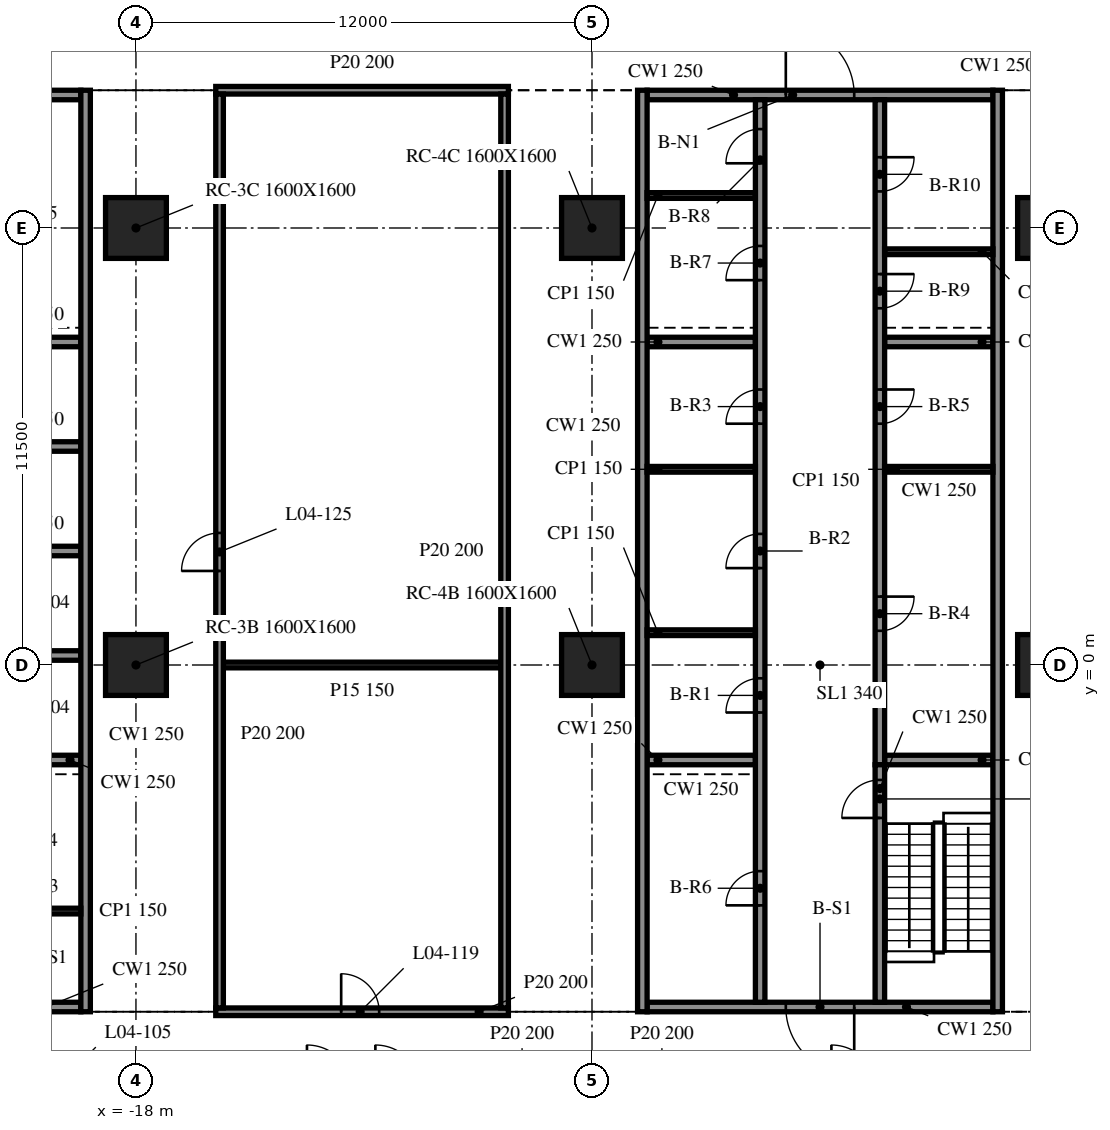
"""IFC4 building model, lengths in metres.
Left out: names, types, materials, properties, quantities, classifications, styles, units other than length and angle.
Written with IfcOpenShell. Run it as: python <this file> out.ifc"""

import sys

from ifc_helpers import new_model, si_unit, direction, frame, frame_2d, origin, origin_2d, place, context, subcontext, project, spatial, rectangle, extrude, element, fill, save


model = new_model("IFC4")
c1 = context("Model", 3, precision=1e-05, world=origin(), true_north=direction((0.0, 1.0)))
c2 = subcontext(c1, "Body", "Model", "MODEL_VIEW")
j1 = project(units=[si_unit("LENGTHUNIT", "METRE"), si_unit("PLANEANGLEUNIT", "RADIAN")], contexts=[c1])
p1 = place(None, origin())
s1 = spatial("IfcSite", under=j1, at=p1, CompositionType="ELEMENT")
p2 = place(p1, origin())
s2 = spatial("IfcBuilding", under=s1, at=p2, CompositionType="ELEMENT")
p3 = place(p2, frame((0.0, 0.0, 20.1)))
s3 = spatial("IfcBuildingStorey", under=s2, at=p3, CompositionType="ELEMENT", Elevation=20.1)
for number, where, z_axis, x_axis in (
    (1, (-18.0, 0.0, -0.34), (0.0, 0.0, 1.0), (1.0, 0.0, 0.0)),
    (2, (-18.0, 11.5, -0.34), (0.0, 0.0, 1.0), (1.0, 0.0, 0.0)),
    (3, (-6.0, 0.0, -0.34), (0.0, 0.0, 1.0), (1.0, 0.0, 0.0)),
    (4, (-6.0, 11.5, -0.34), (0.0, 0.0, 1.0), (1.0, 0.0, 0.0)),
    (5, (6.0, 0.0, -0.34), (0.0, 0.0, 1.0), (1.0, 0.0, 0.0)),
    (6, (6.0, 11.5, -0.34), (0.0, 0.0, 1.0), (1.0, 0.0, 0.0)),
):
    element("IfcColumn", number, at=place(p3, frame(where, z_axis=z_axis, x_axis=x_axis)), inside=s3, PredefinedType="COLUMN", context=c2, shape_type="SweptSolid", body=[
        extrude(rectangle(XDim=1.6, YDim=1.6, at=origin_2d()), origin(), (0.0, 0.0, 1.0), 4.3),
    ])
p4 = place(p3, frame((-19.325, -9.125, 0.0), z_axis=(0.0, 0.0, 1.0), x_axis=(0.0, 1.0, 0.0)))
e7 = element("IfcWall", 7, at=p4, inside=s3, PredefinedType="SOLIDWALL", context=c2, shape_type="SweptSolid", body=[
    extrude(rectangle(XDim=24.25, YDim=0.25, at=frame_2d((12.125, 0.0))), origin(), (0.0, 0.0, 1.0), 3.96),
])
p5 = place(p3, frame((-19.45, -9.0, 0.0), z_axis=(0.0, 0.0, 1.0), x_axis=(-1.0, 0.0, 0.0)))
e8 = element("IfcWall", 8, at=p5, inside=s3, PredefinedType="SOLIDWALL", context=c2, shape_type="SweptSolid", body=[
    extrude(rectangle(XDim=9.1, YDim=0.25, at=frame_2d((4.55, 0.0))), origin(), (0.0, 0.0, 1.0), 3.96),
])
p6 = place(p5, frame((3.65, 0.0, 0.0)))
e9 = element("IfcOpeningElement", 9, at=p6, cuts=e8, PredefinedType="OPENING", context=c2, shape_type="SweptSolid", body=[
    extrude(rectangle(XDim=1.8, YDim=2.1, at=frame_2d((0.9, 1.05))), frame((0.0, 0.135, 0.0), z_axis=(0.0, -1.0, 0.0), x_axis=(1.0, 0.0, 0.0)), (0.0, 0.0, 1.0), 0.27),
])
p7 = place(p3, frame((-28.55, 15.0, 0.0), z_axis=(0.0, 0.0, 1.0), x_axis=(1.0, 0.0, 0.0)))
e10 = element("IfcWall", 10, at=p7, inside=s3, PredefinedType="SOLIDWALL", context=c2, shape_type="SweptSolid", body=[
    extrude(rectangle(XDim=9.1, YDim=0.25, at=frame_2d((4.55, 0.0))), origin(), (0.0, 0.0, 1.0), 3.96),
])
p8 = place(p7, frame((3.65, 0.0, 0.0)))
e11 = element("IfcOpeningElement", 11, at=p8, cuts=e10, PredefinedType="OPENING", context=c2, shape_type="SweptSolid", body=[
    extrude(rectangle(XDim=1.8, YDim=2.1, at=frame_2d((0.9, 1.05))), frame((0.0, 0.135, 0.0), z_axis=(0.0, -1.0, 0.0), x_axis=(1.0, 0.0, 0.0)), (0.0, 0.0, 1.0), 0.27),
])
for number, where, z_axis, x_axis in (
    (12, (-22.3, -2.5, 0.0), (0.0, 0.0, 1.0), (1.0, 0.0, 0.0)),
    (13, (-22.3, 0.25, 0.0), (0.0, 0.0, 1.0), (1.0, 0.0, 0.0)),
    (14, (-22.3, 3.0, 0.0), (0.0, 0.0, 1.0), (1.0, 0.0, 0.0)),
    (15, (-22.3, 5.75, 0.0), (0.0, 0.0, 1.0), (1.0, 0.0, 0.0)),
    (16, (-22.3, 8.5, 0.0), (0.0, 0.0, 1.0), (1.0, 0.0, 0.0)),
):
    element("IfcWall", number, at=place(p3, frame(where, z_axis=z_axis, x_axis=x_axis)), inside=s3, PredefinedType="SOLIDWALL", context=c2, shape_type="SweptSolid", body=[
        extrude(rectangle(XDim=2.85, YDim=0.25, at=frame_2d((1.425, 0.0))), origin(), (0.0, 0.0, 1.0), 3.96),
    ])
p9 = place(p3, frame((-22.3, -6.475, 0.0), z_axis=(0.0, 0.0, 1.0), x_axis=(1.0, 0.0, 0.0)))
e17 = element("IfcWall", 17, at=p9, inside=s3, PredefinedType="PARTITIONING", context=c2, shape_type="SweptSolid", body=[
    extrude(rectangle(XDim=2.85, YDim=0.15, at=frame_2d((1.425, 0.0))), origin(), (0.0, 0.0, 1.0), 3.96),
])
for number, where, z_axis, x_axis in (
    (18, (-4.675, 15.125, 0.0), (0.0, 0.0, 1.0), (0.0, -1.0, 0.0)),
    (19, (4.675, -9.125, 0.0), (0.0, 0.0, 1.0), (0.0, 1.0, 0.0)),
):
    element("IfcWall", number, at=place(p3, frame(where, z_axis=z_axis, x_axis=x_axis)), inside=s3, PredefinedType="SOLIDWALL", context=c2, shape_type="SweptSolid", body=[
        extrude(rectangle(XDim=24.25, YDim=0.25, at=frame_2d((12.125, 0.0))), origin(), (0.0, 0.0, 1.0), 3.96),
    ])
p10 = place(p3, frame((4.55, -9.0, 0.0), z_axis=(0.0, 0.0, 1.0), x_axis=(-1.0, 0.0, 0.0)))
e20 = element("IfcWall", 20, at=p10, inside=s3, PredefinedType="SOLIDWALL", context=c2, shape_type="SweptSolid", body=[
    extrude(rectangle(XDim=9.1, YDim=0.25, at=frame_2d((4.55, 0.0))), origin(), (0.0, 0.0, 1.0), 3.96),
])
p11 = place(p10, frame((3.65, 0.0, 0.0)))
e21 = element("IfcOpeningElement", 21, at=p11, cuts=e20, PredefinedType="OPENING", context=c2, shape_type="SweptSolid", body=[
    extrude(rectangle(XDim=1.8, YDim=2.1, at=frame_2d((0.9, 1.05))), frame((0.0, 0.135, 0.0), z_axis=(0.0, -1.0, 0.0), x_axis=(1.0, 0.0, 0.0)), (0.0, 0.0, 1.0), 0.27),
])
p12 = place(p3, frame((-4.55, 15.0, 0.0), z_axis=(0.0, 0.0, 1.0), x_axis=(1.0, 0.0, 0.0)))
e22 = element("IfcWall", 22, at=p12, inside=s3, PredefinedType="SOLIDWALL", context=c2, shape_type="SweptSolid", body=[
    extrude(rectangle(XDim=9.1, YDim=0.25, at=frame_2d((4.55, 0.0))), origin(), (0.0, 0.0, 1.0), 3.96),
])
p13 = place(p12, frame((3.65, 0.0, 0.0)))
e23 = element("IfcOpeningElement", 23, at=p13, cuts=e22, PredefinedType="OPENING", context=c2, shape_type="SweptSolid", body=[
    extrude(rectangle(XDim=1.8, YDim=2.1, at=frame_2d((0.9, 1.05))), frame((0.0, 0.135, 0.0), z_axis=(0.0, -1.0, 0.0), x_axis=(1.0, 0.0, 0.0)), (0.0, 0.0, 1.0), 0.27),
])
p14 = place(p3, frame((-1.575, -8.875, 0.0), z_axis=(0.0, 0.0, 1.0), x_axis=(0.0, 1.0, 0.0)))
e24 = element("IfcWall", 24, at=p14, inside=s3, PredefinedType="SOLIDWALL", context=c2, shape_type="SweptSolid", body=[
    extrude(rectangle(XDim=23.75, YDim=0.25, at=frame_2d((11.875, 0.0))), origin(), (0.0, 0.0, 1.0), 3.96),
])
p15 = place(p14, frame((7.625, 0.0, 0.0)))
e25 = element("IfcOpeningElement", 25, at=p15, cuts=e24, PredefinedType="OPENING", context=c2, shape_type="SweptSolid", body=[
    extrude(rectangle(XDim=0.9, YDim=2.1, at=frame_2d((0.45, 1.05))), frame((0.0, 0.135, 0.0), z_axis=(0.0, -1.0, 0.0), x_axis=(1.0, 0.0, 0.0)), (0.0, 0.0, 1.0), 0.27),
])
p16 = place(p14, frame((11.425, 0.0, 0.0)))
e26 = element("IfcOpeningElement", 26, at=p16, cuts=e24, PredefinedType="OPENING", context=c2, shape_type="SweptSolid", body=[
    extrude(rectangle(XDim=0.9, YDim=2.1, at=frame_2d((0.45, 1.05))), frame((0.0, 0.135, 0.0), z_axis=(0.0, -1.0, 0.0), x_axis=(1.0, 0.0, 0.0)), (0.0, 0.0, 1.0), 0.27),
])
p17 = place(p14, frame((15.225, 0.0, 0.0)))
e27 = element("IfcOpeningElement", 27, at=p17, cuts=e24, PredefinedType="OPENING", context=c2, shape_type="SweptSolid", body=[
    extrude(rectangle(XDim=0.9, YDim=2.1, at=frame_2d((0.45, 1.05))), frame((0.0, 0.135, 0.0), z_axis=(0.0, -1.0, 0.0), x_axis=(1.0, 0.0, 0.0)), (0.0, 0.0, 1.0), 0.27),
])
p18 = place(p14, frame((2.55, 0.0, 0.0)))
e28 = element("IfcOpeningElement", 28, at=p18, cuts=e24, PredefinedType="OPENING", context=c2, shape_type="SweptSolid", body=[
    extrude(rectangle(XDim=0.9, YDim=2.1, at=frame_2d((0.45, 1.05))), frame((0.0, 0.135, 0.0), z_axis=(0.0, -1.0, 0.0), x_axis=(1.0, 0.0, 0.0)), (0.0, 0.0, 1.0), 0.27),
])
p19 = place(p14, frame((19.002, 0.0, 0.0)))
e29 = element("IfcOpeningElement", 29, at=p19, cuts=e24, PredefinedType="OPENING", context=c2, shape_type="SweptSolid", body=[
    extrude(rectangle(XDim=0.9, YDim=2.1, at=frame_2d((0.45, 1.05))), frame((0.0, 0.135, 0.0), z_axis=(0.0, -1.0, 0.0), x_axis=(1.0, 0.0, 0.0)), (0.0, 0.0, 1.0), 0.27),
])
p20 = place(p14, frame((22.077, 0.0, 0.0)))
e30 = element("IfcOpeningElement", 30, at=p20, cuts=e24, PredefinedType="OPENING", context=c2, shape_type="SweptSolid", body=[
    extrude(rectangle(XDim=0.9, YDim=2.1, at=frame_2d((0.45, 1.05))), frame((0.0, 0.135, 0.0), z_axis=(0.0, -1.0, 0.0), x_axis=(1.0, 0.0, 0.0)), (0.0, 0.0, 1.0), 0.27),
])
p21 = place(p3, frame((1.575, -8.875, 0.0), z_axis=(0.0, 0.0, 1.0), x_axis=(0.0, 1.0, 0.0)))
e31 = element("IfcWall", 31, at=p21, inside=s3, PredefinedType="SOLIDWALL", context=c2, shape_type="SweptSolid", body=[
    extrude(rectangle(XDim=6.25, YDim=0.25, at=frame_2d((3.125, 0.0))), origin(), (0.0, 0.0, 1.0), 3.96),
])
p22 = place(p21, frame((4.85, 0.0, 0.0)))
e32 = element("IfcOpeningElement", 32, at=p22, cuts=e31, PredefinedType="OPENING", context=c2, shape_type="SweptSolid", body=[
    extrude(rectangle(XDim=1.0, YDim=2.1, at=frame_2d((0.5, 1.05))), frame((0.0, 0.135, 0.0), z_axis=(0.0, -1.0, 0.0), x_axis=(1.0, 0.0, 0.0)), (0.0, 0.0, 1.0), 0.27),
])
p23 = place(p3, frame((1.575, 14.875, 0.0), z_axis=(0.0, 0.0, 1.0), x_axis=(0.0, -1.0, 0.0)))
e33 = element("IfcWall", 33, at=p23, inside=s3, PredefinedType="SOLIDWALL", context=c2, shape_type="SweptSolid", body=[
    extrude(rectangle(XDim=17.5, YDim=0.25, at=frame_2d((8.75, 0.0))), origin(), (0.0, 0.0, 1.0), 3.96),
])
p24 = place(p23, frame((13.075, 0.0, 0.0)))
e34 = element("IfcOpeningElement", 34, at=p24, cuts=e33, PredefinedType="OPENING", context=c2, shape_type="SweptSolid", body=[
    extrude(rectangle(XDim=0.9, YDim=2.1, at=frame_2d((0.45, 1.05))), frame((0.0, 0.135, 0.0), z_axis=(0.0, -1.0, 0.0), x_axis=(1.0, 0.0, 0.0)), (0.0, 0.0, 1.0), 0.27),
])
p25 = place(p23, frame((7.625, 0.0, 0.0)))
e35 = element("IfcOpeningElement", 35, at=p25, cuts=e33, PredefinedType="OPENING", context=c2, shape_type="SweptSolid", body=[
    extrude(rectangle(XDim=0.9, YDim=2.1, at=frame_2d((0.45, 1.05))), frame((0.0, 0.135, 0.0), z_axis=(0.0, -1.0, 0.0), x_axis=(1.0, 0.0, 0.0)), (0.0, 0.0, 1.0), 0.27),
])
p26 = place(p23, frame((4.587, 0.0, 0.0)))
e36 = element("IfcOpeningElement", 36, at=p26, cuts=e33, PredefinedType="OPENING", context=c2, shape_type="SweptSolid", body=[
    extrude(rectangle(XDim=0.9, YDim=2.1, at=frame_2d((0.45, 1.05))), frame((0.0, 0.135, 0.0), z_axis=(0.0, -1.0, 0.0), x_axis=(1.0, 0.0, 0.0)), (0.0, 0.0, 1.0), 0.27),
])
p27 = place(p23, frame((1.512, 0.0, 0.0)))
e37 = element("IfcOpeningElement", 37, at=p27, cuts=e33, PredefinedType="OPENING", context=c2, shape_type="SweptSolid", body=[
    extrude(rectangle(XDim=0.9, YDim=2.1, at=frame_2d((0.45, 1.05))), frame((0.0, 0.135, 0.0), z_axis=(0.0, -1.0, 0.0), x_axis=(1.0, 0.0, 0.0)), (0.0, 0.0, 1.0), 0.27),
])
for number, where, z_axis, x_axis in (
    (38, (-4.55, -2.5, 0.0), (0.0, 0.0, 1.0), (1.0, 0.0, 0.0)),
    (39, (-4.55, 8.5, 0.0), (0.0, 0.0, 1.0), (1.0, 0.0, 0.0)),
    (40, (1.7, -2.5, 0.0), (0.0, 0.0, 1.0), (1.0, 0.0, 0.0)),
    (41, (1.7, 8.5, 0.0), (0.0, 0.0, 1.0), (1.0, 0.0, 0.0)),
):
    element("IfcWall", number, at=place(p3, frame(where, z_axis=z_axis, x_axis=x_axis)), inside=s3, PredefinedType="SOLIDWALL", context=c2, shape_type="SweptSolid", body=[
        extrude(rectangle(XDim=2.85, YDim=0.25, at=frame_2d((1.425, 0.0))), origin(), (0.0, 0.0, 1.0), 3.96),
    ])
for number, where, z_axis, x_axis in (
    (42, (-4.55, 0.85, 0.0), (0.0, 0.0, 1.0), (1.0, 0.0, 0.0)),
    (43, (-4.55, 5.15, 0.0), (0.0, 0.0, 1.0), (1.0, 0.0, 0.0)),
    (44, (1.7, 5.15, 0.0), (0.0, 0.0, 1.0), (1.0, 0.0, 0.0)),
    (45, (-4.55, 12.355, 0.0), (0.0, 0.0, 1.0), (1.0, 0.0, 0.0)),
    (46, (1.7, 10.875, 0.0), (0.0, 0.0, 1.0), (1.0, 0.0, 0.0)),
):
    element("IfcWall", number, at=place(p3, frame(where, z_axis=z_axis, x_axis=x_axis)), inside=s3, PredefinedType="PARTITIONING", context=c2, shape_type="SweptSolid", body=[
        extrude(rectangle(XDim=2.85, YDim=0.15, at=frame_2d((1.425, 0.0))), origin(), (0.0, 0.0, 1.0), 3.96),
    ])
p28 = place(p3, frame((-15.9, -9.125, 0.0), z_axis=(0.0, 0.0, 1.0), x_axis=(1.0, 0.0, 0.0)))
e47 = element("IfcWall", 47, at=p28, inside=s3, PredefinedType="PARTITIONING", context=c2, shape_type="SweptSolid", body=[
    extrude(rectangle(XDim=7.7, YDim=0.2, at=frame_2d((3.85, 0.0))), origin(), (0.0, 0.0, 1.0), 3.96),
])
p29 = place(p28, frame((3.3, 0.0, 0.0)))
e48 = element("IfcOpeningElement", 48, at=p29, cuts=e47, PredefinedType="OPENING", context=c2, shape_type="SweptSolid", body=[
    extrude(rectangle(XDim=1.0, YDim=2.1, at=frame_2d((0.5, 1.05))), frame((0.0, 0.11, 0.0), z_axis=(0.0, -1.0, 0.0), x_axis=(1.0, 0.0, 0.0)), (0.0, 0.0, 1.0), 0.22),
])
p30 = place(p3, frame((-15.7, 0.0, 0.0), z_axis=(0.0, 0.0, 1.0), x_axis=(1.0, 0.0, 0.0)))
e49 = element("IfcWall", 49, at=p30, inside=s3, PredefinedType="PARTITIONING", context=c2, shape_type="SweptSolid", body=[
    extrude(rectangle(XDim=7.3, YDim=0.15, at=frame_2d((3.65, 0.0))), origin(), (0.0, 0.0, 1.0), 3.96),
])
p31 = place(p3, frame((-15.9, 15.125, 0.0), z_axis=(0.0, 0.0, 1.0), x_axis=(1.0, 0.0, 0.0)))
e50 = element("IfcWall", 50, at=p31, inside=s3, PredefinedType="PARTITIONING", context=c2, shape_type="SweptSolid", body=[
    extrude(rectangle(XDim=7.7, YDim=0.2, at=frame_2d((3.85, 0.0))), origin(), (0.0, 0.0, 1.0), 3.96),
])
p32 = place(p3, frame((-15.8, -9.025, 0.0), z_axis=(0.0, 0.0, 1.0), x_axis=(0.0, 1.0, 0.0)))
e51 = element("IfcWall", 51, at=p32, inside=s3, PredefinedType="PARTITIONING", context=c2, shape_type="SweptSolid", body=[
    extrude(rectangle(XDim=24.05, YDim=0.2, at=frame_2d((12.025, 0.0))), origin(), (0.0, 0.0, 1.0), 3.96),
])
p33 = place(p32, frame((11.5, 0.0, 0.0)))
e52 = element("IfcOpeningElement", 52, at=p33, cuts=e51, PredefinedType="OPENING", context=c2, shape_type="SweptSolid", body=[
    extrude(rectangle(XDim=1.0, YDim=2.1, at=frame_2d((0.5, 1.05))), frame((0.0, 0.11, 0.0), z_axis=(0.0, -1.0, 0.0), x_axis=(1.0, 0.0, 0.0)), (0.0, 0.0, 1.0), 0.22),
])
p34 = place(p3, frame((-8.3, -9.025, 0.0), z_axis=(0.0, 0.0, 1.0), x_axis=(0.0, 1.0, 0.0)))
e53 = element("IfcWall", 53, at=p34, inside=s3, PredefinedType="PARTITIONING", context=c2, shape_type="SweptSolid", body=[
    extrude(rectangle(XDim=24.05, YDim=0.2, at=frame_2d((12.025, 0.0))), origin(), (0.0, 0.0, 1.0), 3.96),
])
p35 = place(p11, origin())
e54 = element("IfcDoor", 54, at=p35, inside=s3, OperationType="DOUBLE_DOOR_SINGLE_SWING", PredefinedType="DOOR", context=c2, shape_type="SweptSolid", body=[
    extrude(rectangle(XDim=1.8, YDim=2.1, at=frame_2d((0.9, 1.05))), frame((0.0, 0.025, 0.0), z_axis=(0.0, -1.0, 0.0), x_axis=(1.0, 0.0, 0.0)), (0.0, 0.0, 1.0), 0.05),
])
fill(e21, e54)
p36 = place(p13, origin())
e55 = element("IfcDoor", 55, at=p36, inside=s3, OperationType="DOUBLE_DOOR_SINGLE_SWING", PredefinedType="DOOR", context=c2, shape_type="SweptSolid", body=[
    extrude(rectangle(XDim=1.8, YDim=2.1, at=frame_2d((0.9, 1.05))), frame((0.0, 0.025, 0.0), z_axis=(0.0, -1.0, 0.0), x_axis=(1.0, 0.0, 0.0)), (0.0, 0.0, 1.0), 0.05),
])
fill(e23, e55)
p37 = place(p15, origin())
e56 = element("IfcDoor", 56, at=p37, inside=s3, OperationType="SINGLE_SWING_LEFT", PredefinedType="DOOR", context=c2, shape_type="SweptSolid", body=[
    extrude(rectangle(XDim=0.9, YDim=2.1, at=frame_2d((0.45, 1.05))), frame((0.0, 0.025, 0.0), z_axis=(0.0, -1.0, 0.0), x_axis=(1.0, 0.0, 0.0)), (0.0, 0.0, 1.0), 0.05),
])
fill(e25, e56)
p38 = place(p16, origin())
e57 = element("IfcDoor", 57, at=p38, inside=s3, OperationType="SINGLE_SWING_RIGHT", PredefinedType="DOOR", context=c2, shape_type="SweptSolid", body=[
    extrude(rectangle(XDim=0.9, YDim=2.1, at=frame_2d((0.45, 1.05))), frame((0.0, 0.025, 0.0), z_axis=(0.0, -1.0, 0.0), x_axis=(1.0, 0.0, 0.0)), (0.0, 0.0, 1.0), 0.05),
])
fill(e26, e57)
p39 = place(p17, origin())
e58 = element("IfcDoor", 58, at=p39, inside=s3, OperationType="SINGLE_SWING_LEFT", PredefinedType="DOOR", context=c2, shape_type="SweptSolid", body=[
    extrude(rectangle(XDim=0.9, YDim=2.1, at=frame_2d((0.45, 1.05))), frame((0.0, 0.025, 0.0), z_axis=(0.0, -1.0, 0.0), x_axis=(1.0, 0.0, 0.0)), (0.0, 0.0, 1.0), 0.05),
])
fill(e27, e58)
p40 = place(p24, origin())
e59 = element("IfcDoor", 59, at=p40, inside=s3, OperationType="SINGLE_SWING_RIGHT", PredefinedType="DOOR", context=c2, shape_type="SweptSolid", body=[
    extrude(rectangle(XDim=0.9, YDim=2.1, at=frame_2d((0.45, 1.05))), frame((0.0, 0.025, 0.0), z_axis=(0.0, -1.0, 0.0), x_axis=(1.0, 0.0, 0.0)), (0.0, 0.0, 1.0), 0.05),
])
fill(e34, e59)
p41 = place(p25, origin())
e60 = element("IfcDoor", 60, at=p41, inside=s3, OperationType="SINGLE_SWING_LEFT", PredefinedType="DOOR", context=c2, shape_type="SweptSolid", body=[
    extrude(rectangle(XDim=0.9, YDim=2.1, at=frame_2d((0.45, 1.05))), frame((0.0, 0.025, 0.0), z_axis=(0.0, -1.0, 0.0), x_axis=(1.0, 0.0, 0.0)), (0.0, 0.0, 1.0), 0.05),
])
fill(e35, e60)
p42 = place(p18, origin())
e61 = element("IfcDoor", 61, at=p42, inside=s3, OperationType="SINGLE_SWING_RIGHT", PredefinedType="DOOR", context=c2, shape_type="SweptSolid", body=[
    extrude(rectangle(XDim=0.9, YDim=2.1, at=frame_2d((0.45, 1.05))), frame((0.0, 0.025, 0.0), z_axis=(0.0, -1.0, 0.0), x_axis=(1.0, 0.0, 0.0)), (0.0, 0.0, 1.0), 0.05),
])
fill(e28, e61)
p43 = place(p19, origin())
e62 = element("IfcDoor", 62, at=p43, inside=s3, OperationType="SINGLE_SWING_LEFT", PredefinedType="DOOR", context=c2, shape_type="SweptSolid", body=[
    extrude(rectangle(XDim=0.9, YDim=2.1, at=frame_2d((0.45, 1.05))), frame((0.0, 0.025, 0.0), z_axis=(0.0, -1.0, 0.0), x_axis=(1.0, 0.0, 0.0)), (0.0, 0.0, 1.0), 0.05),
])
fill(e29, e62)
p44 = place(p20, origin())
e63 = element("IfcDoor", 63, at=p44, inside=s3, OperationType="SINGLE_SWING_RIGHT", PredefinedType="DOOR", context=c2, shape_type="SweptSolid", body=[
    extrude(rectangle(XDim=0.9, YDim=2.1, at=frame_2d((0.45, 1.05))), frame((0.0, 0.025, 0.0), z_axis=(0.0, -1.0, 0.0), x_axis=(1.0, 0.0, 0.0)), (0.0, 0.0, 1.0), 0.05),
])
fill(e30, e63)
p45 = place(p26, origin())
e64 = element("IfcDoor", 64, at=p45, inside=s3, OperationType="SINGLE_SWING_LEFT", PredefinedType="DOOR", context=c2, shape_type="SweptSolid", body=[
    extrude(rectangle(XDim=0.9, YDim=2.1, at=frame_2d((0.45, 1.05))), frame((0.0, 0.025, 0.0), z_axis=(0.0, -1.0, 0.0), x_axis=(1.0, 0.0, 0.0)), (0.0, 0.0, 1.0), 0.05),
])
fill(e36, e64)
p46 = place(p27, origin())
e65 = element("IfcDoor", 65, at=p46, inside=s3, OperationType="SINGLE_SWING_RIGHT", PredefinedType="DOOR", context=c2, shape_type="SweptSolid", body=[
    extrude(rectangle(XDim=0.9, YDim=2.1, at=frame_2d((0.45, 1.05))), frame((0.0, 0.025, 0.0), z_axis=(0.0, -1.0, 0.0), x_axis=(1.0, 0.0, 0.0)), (0.0, 0.0, 1.0), 0.05),
])
fill(e37, e65)
p47 = place(p22, origin())
e66 = element("IfcDoor", 66, at=p47, inside=s3, OperationType="SINGLE_SWING_LEFT", PredefinedType="DOOR", context=c2, shape_type="SweptSolid", body=[
    extrude(rectangle(XDim=1.0, YDim=2.1, at=frame_2d((0.5, 1.05))), frame((0.0, 0.025, 0.0), z_axis=(0.0, -1.0, 0.0), x_axis=(1.0, 0.0, 0.0)), (0.0, 0.0, 1.0), 0.05),
])
fill(e32, e66)
p48 = place(p29, origin())
e67 = element("IfcDoor", 67, at=p48, inside=s3, OperationType="SINGLE_SWING_LEFT", PredefinedType="DOOR", context=c2, shape_type="SweptSolid", body=[
    extrude(rectangle(XDim=1.0, YDim=2.1, at=frame_2d((0.5, 1.05))), frame((0.0, 0.025, 0.0), z_axis=(0.0, -1.0, 0.0), x_axis=(1.0, 0.0, 0.0)), (0.0, 0.0, 1.0), 0.05),
])
fill(e48, e67)
p49 = place(p33, origin())
e68 = element("IfcDoor", 68, at=p49, inside=s3, OperationType="SINGLE_SWING_RIGHT", PredefinedType="DOOR", context=c2, shape_type="SweptSolid", body=[
    extrude(rectangle(XDim=1.0, YDim=2.1, at=frame_2d((0.5, 1.05))), frame((0.0, 0.025, 0.0), z_axis=(0.0, -1.0, 0.0), x_axis=(1.0, 0.0, 0.0)), (0.0, 0.0, 1.0), 0.05),
])
fill(e52, e68)
save(model, sys.argv[1])
